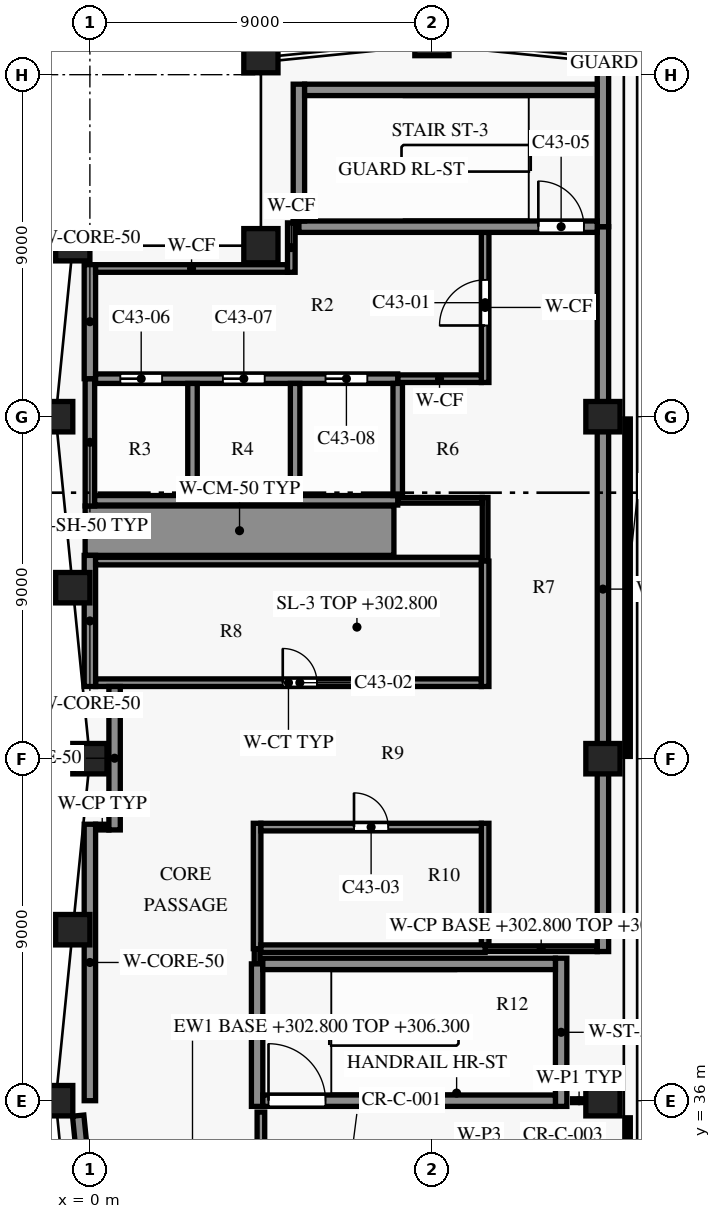
"""IFC4 building model, lengths in metres.
Left out: names, types, materials, properties, quantities, classifications, styles, units other than length and angle.
Written with IfcOpenShell. Run it as: python <this file> out.ifc"""

import sys

from ifc_helpers import new_model, si_unit, direction, frame, frame_2d, origin, origin_2d, place, context, subcontext, project, spatial, rectangle, extrude, element, fill, save


model = new_model("IFC4")
c1 = context("Model", 3, precision=1e-05, world=origin(), true_north=direction((0.0, 1.0)))
c2 = subcontext(c1, "Body", "Model", "MODEL_VIEW")
j1 = project(units=[si_unit("LENGTHUNIT", "METRE"), si_unit("PLANEANGLEUNIT", "RADIAN")], contexts=[c1])
p1 = place(None, origin())
s1 = spatial("IfcSite", under=j1, at=p1, CompositionType="ELEMENT")
p2 = place(p1, origin())
s2 = spatial("IfcBuilding", under=s1, at=p2, CompositionType="ELEMENT")
p3 = place(p2, frame((0.0, 0.0, 302.8)))
s3 = spatial("IfcBuildingStorey", under=s2, at=p3, CompositionType="ELEMENT", Elevation=302.8)
for number, where, z_axis, x_axis in (
    (1, (13.5, 36.0, 0.0), (0.0, 0.0, 1.0), (1.0, 0.0, 0.0)),
    (2, (13.5, 45.0, 0.0), (0.0, 0.0, 1.0), (1.0, 0.0, 0.0)),
    (3, (13.5, 54.0, 0.0), (0.0, 0.0, 1.0), (1.0, 0.0, 0.0)),
    (4, (13.5, 63.45, 0.0), (0.0, 0.0, 1.0), (-0.995, 0.1, 0.0)),
    (5, (9.0, 63.9, 0.0), (0.0, 0.0, 1.0), (-1.0, 0.0, 0.0)),
    (6, (4.5, 63.45, 0.0), (0.0, 0.0, 1.0), (-0.995, -0.1, 0.0)),
    (7, (-0.45, 58.5, 0.0), (0.0, 0.0, 1.0), (-0.1, -0.995, 0.0)),
    (8, (-0.9, 54.0, 0.0), (0.0, 0.0, 1.0), (0.0, -1.0, 0.0)),
    (9, (-0.45, 49.5, 0.0), (0.0, 0.0, 1.0), (0.1, -0.995, 0.0)),
    (10, (0.0, 45.0, 0.0), (0.0, 0.0, 1.0), (0.0, -1.0, 0.0)),
    (11, (-0.45, 40.5, 0.0), (0.0, 0.0, 1.0), (-0.1, -0.995, 0.0)),
    (12, (-0.9, 36.0, 0.0), (0.0, 0.0, 1.0), (0.0, -1.0, 0.0)),
):
    element("IfcColumn", number, at=place(p3, frame(where, z_axis=z_axis, x_axis=x_axis)), inside=s3, PredefinedType="COLUMN", context=c2, shape_type="SweptSolid", body=[
        extrude(rectangle(XDim=0.9, YDim=0.8, at=origin_2d()), origin(), (0.0, 0.0, 1.0), 4.0),
    ])
p4 = place(p3, frame((4.5, 58.5, 0.0), z_axis=(0.0, 0.0, 1.0), x_axis=(1.0, 0.0, 0.0)))
e13 = element("IfcColumn", 13, at=p4, inside=s3, PredefinedType="COLUMN", context=c2, shape_type="SweptSolid", body=[
    extrude(rectangle(XDim=0.9, YDim=0.9, at=origin_2d()), origin(), (0.0, 0.0, 1.0), 4.0),
])
p5 = place(p3, frame((0.061, 31.915, 0.0), z_axis=(0.0, 0.0, 1.0), x_axis=(-0.099549320092, 0.995032629048, 0.0)))
e14 = element("IfcWall", 14, at=p5, inside=s3, PredefinedType="SOLIDWALL", context=c2, shape_type="SweptSolid", body=[
    extrude(rectangle(XDim=3.71, YDim=0.3, at=frame_2d((1.855, 0.0))), origin(), (0.0, 0.0, 1.0), 3.5),
])
p6 = place(p3, frame((4.55, 36.0, 0.0), z_axis=(0.0, 0.0, 1.0), x_axis=(1.0, 0.0, 0.0)))
e15 = element("IfcWall", 15, at=p6, inside=s3, PredefinedType="SHEAR", context=c2, shape_type="SweptSolid", body=[
    extrude(rectangle(XDim=7.7, YDim=0.3, at=frame_2d((3.85, 0.0))), origin(), (0.0, 0.0, 1.0), 3.7),
])
p7 = place(p6, frame((0.15, 0.0, 0.0)))
e16 = element("IfcOpeningElement", 16, at=p7, cuts=e15, PredefinedType="OPENING", context=c2, shape_type="SweptSolid", body=[
    extrude(rectangle(XDim=1.5, YDim=2.2, at=frame_2d((0.75, 1.1))), frame((0.0, 0.16, 0.0), z_axis=(0.0, -1.0, 0.0), x_axis=(1.0, 0.0, 0.0)), (0.0, 0.0, 1.0), 0.32),
])
p8 = place(p3, frame((4.55, 39.6, 0.0), z_axis=(0.0, 0.0, 1.0), x_axis=(1.0, 0.0, 0.0)))
e17 = element("IfcWall", 17, at=p8, inside=s3, PredefinedType="SHEAR", context=c2, shape_type="SweptSolid", body=[
    extrude(rectangle(XDim=7.7, YDim=0.3, at=frame_2d((3.85, 0.0))), origin(), (0.0, 0.0, 1.0), 3.7),
])
p9 = place(p3, frame((10.4, 40.0, 0.0), z_axis=(0.0, 0.0, 1.0), x_axis=(1.0, 0.0, 0.0)))
e18 = element("IfcWall", 18, at=p9, inside=s3, PredefinedType="PARTITIONING", context=c2, shape_type="SweptSolid", body=[
    extrude(rectangle(XDim=2.95, YDim=0.15, at=frame_2d((1.475, 0.0))), origin(), (0.0, 0.0, 1.0), 3.35),
])
p10 = place(p3, frame((4.5, 40.0, 0.0), z_axis=(0.0, 0.0, 1.0), x_axis=(1.0, 0.0, 0.0)))
e19 = element("IfcWall", 19, at=p10, inside=s3, PredefinedType="PARTITIONING", context=c2, shape_type="SweptSolid", body=[
    extrude(rectangle(XDim=5.9, YDim=0.2, at=frame_2d((2.95, 0.0))), origin(), (0.0, 0.0, 1.0), 3.7),
])
p11 = place(p3, frame((0.15, 43.2, 0.0), z_axis=(0.0, 0.0, 1.0), x_axis=(1.0, 0.0, 0.0)))
e20 = element("IfcWall", 20, at=p11, inside=s3, PredefinedType="PARTITIONING", context=c2, shape_type="SweptSolid", body=[
    extrude(rectangle(XDim=0.35, YDim=0.15, at=frame_2d((0.175, 0.0))), origin(), (0.0, 0.0, 1.0), 3.7),
])
p12 = place(p3, frame((4.5, 43.2, 0.0), z_axis=(0.0, 0.0, 1.0), x_axis=(1.0, 0.0, 0.0)))
e21 = element("IfcWall", 21, at=p12, inside=s3, PredefinedType="PARTITIONING", context=c2, shape_type="SweptSolid", body=[
    extrude(rectangle(XDim=5.8, YDim=0.2, at=frame_2d((2.9, 0.0))), origin(), (0.0, 0.0, 1.0), 3.7),
])
p13 = place(p12, frame((2.45, 0.0, 0.0)))
e22 = element("IfcOpeningElement", 22, at=p13, cuts=e21, PredefinedType="OPENING", context=c2, shape_type="SweptSolid", body=[
    extrude(rectangle(XDim=0.9, YDim=2.1, at=frame_2d((0.45, 1.05))), frame((0.0, 0.11, 0.0), z_axis=(0.0, -1.0, 0.0), x_axis=(1.0, 0.0, 0.0)), (0.0, 0.0, 1.0), 0.22),
])
p14 = place(p3, frame((0.15, 47.0, 0.0), z_axis=(0.0, 0.0, 1.0), x_axis=(1.0, 0.0, 0.0)))
e23 = element("IfcWall", 23, at=p14, inside=s3, PredefinedType="PARTITIONING", context=c2, shape_type="SweptSolid", body=[
    extrude(rectangle(XDim=10.15, YDim=0.2, at=frame_2d((5.075, 0.0))), origin(), (0.0, 0.0, 1.0), 3.7),
])
p15 = place(p14, frame((4.925, 0.0, 0.0)))
e24 = element("IfcOpeningElement", 24, at=p15, cuts=e23, PredefinedType="OPENING", context=c2, shape_type="SweptSolid", body=[
    extrude(rectangle(XDim=0.9, YDim=2.1, at=frame_2d((0.45, 1.05))), frame((0.0, 0.11, 0.0), z_axis=(0.0, -1.0, 0.0), x_axis=(1.0, 0.0, 0.0)), (0.0, 0.0, 1.0), 0.22),
])
p16 = place(p3, frame((0.15, 50.2, 0.0), z_axis=(0.0, 0.0, 1.0), x_axis=(1.0, 0.0, 0.0)))
e25 = element("IfcWall", 25, at=p16, inside=s3, PredefinedType="PARTITIONING", context=c2, shape_type="SweptSolid", body=[
    extrude(rectangle(XDim=10.15, YDim=0.2, at=frame_2d((5.075, 0.0))), origin(), (0.0, 0.0, 1.0), 3.7),
])
p17 = place(p3, frame((-0.125, 51.0, 0.0), z_axis=(0.0, 0.0, 1.0), x_axis=(1.0, 0.0, 0.0)))
e26 = element("IfcWall", 26, at=p17, inside=s3, PredefinedType="SHEAR", context=c2, shape_type="SweptSolid", body=[
    extrude(rectangle(XDim=8.125, YDim=1.3, at=frame_2d((4.062, 0.0))), origin(), (0.0, 0.0, 1.0), 3.7),
])
p18 = place(p3, frame((8.1, 51.8, 0.0), z_axis=(0.0, 0.0, 1.0), x_axis=(1.0, 0.0, 0.0)))
e27 = element("IfcWall", 27, at=p18, inside=s3, PredefinedType="PARTITIONING", context=c2, shape_type="SweptSolid", body=[
    extrude(rectangle(XDim=2.225, YDim=0.15, at=frame_2d((1.112, 0.0))), origin(), (0.0, 0.0, 1.0), 3.7),
])
p19 = place(p3, frame((0.125, 51.8, 0.0), z_axis=(0.0, 0.0, 1.0), x_axis=(1.0, 0.0, 0.0)))
e28 = element("IfcWall", 28, at=p19, inside=s3, PredefinedType="SHEAR", context=c2, shape_type="SweptSolid", body=[
    extrude(rectangle(XDim=7.975, YDim=0.25, at=frame_2d((3.988, 0.0))), origin(), (0.0, 0.0, 1.0), 3.7),
])
p20 = place(p3, frame((8.1, 55.0, 0.0), z_axis=(0.0, 0.0, 1.0), x_axis=(1.0, 0.0, 0.0)))
e29 = element("IfcWall", 29, at=p20, inside=s3, PredefinedType="PARTITIONING", context=c2, shape_type="SweptSolid", body=[
    extrude(rectangle(XDim=2.2, YDim=0.2, at=frame_2d((1.1, 0.0))), origin(), (0.0, 0.0, 1.0), 3.7),
])
p21 = place(p3, frame((0.15, 55.0, 0.0), z_axis=(0.0, 0.0, 1.0), x_axis=(1.0, 0.0, 0.0)))
e30 = element("IfcWall", 30, at=p21, inside=s3, PredefinedType="SHEAR", context=c2, shape_type="SweptSolid", body=[
    extrude(rectangle(XDim=7.95, YDim=0.25, at=frame_2d((3.975, 0.0))), origin(), (0.0, 0.0, 1.0), 3.7),
])
p22 = place(p21, frame((0.65, 0.0, 0.0)))
e31 = element("IfcOpeningElement", 31, at=p22, cuts=e30, PredefinedType="OPENING", context=c2, shape_type="SweptSolid", body=[
    extrude(rectangle(XDim=1.1, YDim=2.1, at=frame_2d((0.55, 1.05))), frame((0.0, 0.135, 0.0), z_axis=(0.0, -1.0, 0.0), x_axis=(1.0, 0.0, 0.0)), (0.0, 0.0, 1.0), 0.27),
])
p23 = place(p21, frame((3.35, 0.0, 0.0)))
e32 = element("IfcOpeningElement", 32, at=p23, cuts=e30, PredefinedType="OPENING", context=c2, shape_type="SweptSolid", body=[
    extrude(rectangle(XDim=1.1, YDim=2.1, at=frame_2d((0.55, 1.05))), frame((0.0, 0.135, 0.0), z_axis=(0.0, -1.0, 0.0), x_axis=(1.0, 0.0, 0.0)), (0.0, 0.0, 1.0), 0.27),
])
p24 = place(p21, frame((6.05, 0.0, 0.0)))
e33 = element("IfcOpeningElement", 33, at=p24, cuts=e30, PredefinedType="OPENING", context=c2, shape_type="SweptSolid", body=[
    extrude(rectangle(XDim=1.1, YDim=2.1, at=frame_2d((0.55, 1.05))), frame((0.0, 0.135, 0.0), z_axis=(0.0, -1.0, 0.0), x_axis=(1.0, 0.0, 0.0)), (0.0, 0.0, 1.0), 0.27),
])
p25 = place(p3, frame((0.15, 57.9, 0.0), z_axis=(0.0, 0.0, 1.0), x_axis=(1.0, 0.0, 0.0)))
e34 = element("IfcWall", 34, at=p25, inside=s3, PredefinedType="PARTITIONING", context=c2, shape_type="SweptSolid", body=[
    extrude(rectangle(XDim=5.05, YDim=0.2, at=frame_2d((2.525, 0.0))), origin(), (0.0, 0.0, 1.0), 3.7),
])
p26 = place(p3, frame((5.5, 59.0, 0.0), z_axis=(0.0, 0.0, 1.0), x_axis=(1.0, 0.0, 0.0)))
e35 = element("IfcWall", 35, at=p26, inside=s3, PredefinedType="SHEAR", context=c2, shape_type="SweptSolid", body=[
    extrude(rectangle(XDim=7.85, YDim=0.3, at=frame_2d((3.925, 0.0))), origin(), (0.0, 0.0, 1.0), 3.7),
])
p27 = place(p26, frame((6.3, 0.0, 0.0)))
e36 = element("IfcOpeningElement", 36, at=p27, cuts=e35, PredefinedType="OPENING", context=c2, shape_type="SweptSolid", body=[
    extrude(rectangle(XDim=1.2, YDim=2.2, at=frame_2d((0.6, 1.1))), frame((0.0, 0.16, 0.0), z_axis=(0.0, -1.0, 0.0), x_axis=(1.0, 0.0, 0.0)), (0.0, 0.0, 1.0), 0.32),
])
p28 = place(p3, frame((5.65, 62.6, 0.0), z_axis=(0.0, 0.0, 1.0), x_axis=(1.0, 0.0, 0.0)))
e37 = element("IfcWall", 37, at=p28, inside=s3, PredefinedType="SHEAR", context=c2, shape_type="SweptSolid", body=[
    extrude(rectangle(XDim=7.7, YDim=0.3, at=frame_2d((3.85, 0.0))), origin(), (0.0, 0.0, 1.0), 3.7),
])
p29 = place(p3, frame((0.0, 36.0, 0.0), z_axis=(0.0, 0.0, 1.0), x_axis=(0.0, 1.0, 0.0)))
e38 = element("IfcWall", 38, at=p29, inside=s3, PredefinedType="SHEAR", context=c2, shape_type="SweptSolid", body=[
    extrude(rectangle(XDim=7.275, YDim=0.3, at=frame_2d((3.637, 0.0))), origin(), (0.0, 0.0, 1.0), 3.7),
])
p30 = place(p3, frame((0.0, 46.9, 0.0), z_axis=(0.0, 0.0, 1.0), x_axis=(0.0, 1.0, 0.0)))
e39 = element("IfcWall", 39, at=p30, inside=s3, PredefinedType="SHEAR", context=c2, shape_type="SweptSolid", body=[
    extrude(rectangle(XDim=3.45, YDim=0.3, at=frame_2d((1.725, 0.0))), origin(), (0.0, 0.0, 1.0), 3.7),
])
p31 = place(p3, frame((0.0, 55.0, 0.0), z_axis=(0.0, 0.0, 1.0), x_axis=(0.0, 1.0, 0.0)))
e40 = element("IfcWall", 40, at=p31, inside=s3, PredefinedType="SHEAR", context=c2, shape_type="SweptSolid", body=[
    extrude(rectangle(XDim=3.0, YDim=0.3, at=frame_2d((1.5, 0.0))), origin(), (0.0, 0.0, 1.0), 3.7),
])
p32 = place(p3, frame((0.0, 51.65, 0.0), z_axis=(0.0, 0.0, 1.0), x_axis=(0.0, 1.0, 0.0)))
e41 = element("IfcWall", 41, at=p32, inside=s3, PredefinedType="SHEAR", context=c2, shape_type="SweptSolid", body=[
    extrude(rectangle(XDim=3.35, YDim=0.25, at=frame_2d((1.675, 0.0))), origin(), (0.0, 0.0, 1.0), 3.7),
])
p33 = place(p3, frame((0.65, 43.125, 0.0), z_axis=(0.0, 0.0, 1.0), x_axis=(0.0, 1.0, 0.0)))
e42 = element("IfcWall", 42, at=p33, inside=s3, PredefinedType="SHEAR", context=c2, shape_type="SweptSolid", body=[
    extrude(rectangle(XDim=3.775, YDim=0.3, at=frame_2d((1.887, 0.0))), origin(), (0.0, 0.0, 1.0), 3.7),
])
p34 = place(p3, frame((2.7, 51.925, 0.0), z_axis=(0.0, 0.0, 1.0), x_axis=(0.0, 1.0, 0.0)))
e43 = element("IfcWall", 43, at=p34, inside=s3, PredefinedType="SHEAR", context=c2, shape_type="SweptSolid", body=[
    extrude(rectangle(XDim=2.95, YDim=0.25, at=frame_2d((1.475, 0.0))), origin(), (0.0, 0.0, 1.0), 3.7),
])
p35 = place(p3, frame((4.4, 39.6, 0.0), z_axis=(0.0, 0.0, 1.0), x_axis=(0.0, 1.0, 0.0)))
e44 = element("IfcWall", 44, at=p35, inside=s3, PredefinedType="PARTITIONING", context=c2, shape_type="SweptSolid", body=[
    extrude(rectangle(XDim=0.4, YDim=0.15, at=frame_2d((0.2, 0.0))), origin(), (0.0, 0.0, 1.0), 3.7),
])
p36 = place(p3, frame((4.4, 40.0, 0.0), z_axis=(0.0, 0.0, 1.0), x_axis=(0.0, 1.0, 0.0)))
e45 = element("IfcWall", 45, at=p36, inside=s3, PredefinedType="PARTITIONING", context=c2, shape_type="SweptSolid", body=[
    extrude(rectangle(XDim=3.3, YDim=0.2, at=frame_2d((1.65, 0.0))), origin(), (0.0, 0.0, 1.0), 3.7),
])
p37 = place(p3, frame((4.4, 35.85, 0.0), z_axis=(0.0, 0.0, 1.0), x_axis=(0.0, 1.0, 0.0)))
e46 = element("IfcWall", 46, at=p37, inside=s3, PredefinedType="SHEAR", context=c2, shape_type="SweptSolid", body=[
    extrude(rectangle(XDim=3.75, YDim=0.3, at=frame_2d((1.875, 0.0))), origin(), (0.0, 0.0, 1.0), 3.7),
])
p38 = place(p3, frame((5.3, 57.8, 0.0), z_axis=(0.0, 0.0, 1.0), x_axis=(0.0, 1.0, 0.0)))
e47 = element("IfcWall", 47, at=p38, inside=s3, PredefinedType="PARTITIONING", context=c2, shape_type="SweptSolid", body=[
    extrude(rectangle(XDim=1.3, YDim=0.2, at=frame_2d((0.65, 0.0))), origin(), (0.0, 0.0, 1.0), 3.7),
])
p39 = place(p3, frame((5.4, 51.925, 0.0), z_axis=(0.0, 0.0, 1.0), x_axis=(0.0, 1.0, 0.0)))
e48 = element("IfcWall", 48, at=p39, inside=s3, PredefinedType="SHEAR", context=c2, shape_type="SweptSolid", body=[
    extrude(rectangle(XDim=2.95, YDim=0.25, at=frame_2d((1.475, 0.0))), origin(), (0.0, 0.0, 1.0), 3.7),
])
p40 = place(p3, frame((5.5, 59.15, 0.0), z_axis=(0.0, 0.0, 1.0), x_axis=(0.0, 1.0, 0.0)))
e49 = element("IfcWall", 49, at=p40, inside=s3, PredefinedType="SHEAR", context=c2, shape_type="SweptSolid", body=[
    extrude(rectangle(XDim=3.6, YDim=0.3, at=frame_2d((1.8, 0.0))), origin(), (0.0, 0.0, 1.0), 3.7),
])
p41 = place(p3, frame((8.1, 51.925, 0.0), z_axis=(0.0, 0.0, 1.0), x_axis=(0.0, 1.0, 0.0)))
e50 = element("IfcWall", 50, at=p41, inside=s3, PredefinedType="SHEAR", context=c2, shape_type="SweptSolid", body=[
    extrude(rectangle(XDim=2.95, YDim=0.25, at=frame_2d((1.475, 0.0))), origin(), (0.0, 0.0, 1.0), 3.7),
])
p42 = place(p3, frame((10.4, 54.9, 0.0), z_axis=(0.0, 0.0, 1.0), x_axis=(0.0, 1.0, 0.0)))
e51 = element("IfcWall", 51, at=p42, inside=s3, PredefinedType="PARTITIONING", context=c2, shape_type="SweptSolid", body=[
    extrude(rectangle(XDim=3.95, YDim=0.2, at=frame_2d((1.975, 0.0))), origin(), (0.0, 0.0, 1.0), 3.7),
])
p43 = place(p42, frame((1.5, 0.0, 0.0)))
e52 = element("IfcOpeningElement", 52, at=p43, cuts=e51, PredefinedType="OPENING", context=c2, shape_type="SweptSolid", body=[
    extrude(rectangle(XDim=1.2, YDim=2.2, at=frame_2d((0.6, 1.1))), frame((0.0, 0.11, 0.0), z_axis=(0.0, -1.0, 0.0), x_axis=(1.0, 0.0, 0.0)), (0.0, 0.0, 1.0), 0.22),
])
p44 = place(p3, frame((10.4, 50.2, 0.0), z_axis=(0.0, 0.0, 1.0), x_axis=(0.0, 1.0, 0.0)))
e53 = element("IfcWall", 53, at=p44, inside=s3, PredefinedType="PARTITIONING", context=c2, shape_type="SweptSolid", body=[
    extrude(rectangle(XDim=1.675, YDim=0.15, at=frame_2d((0.837, 0.0))), origin(), (0.0, 0.0, 1.0), 3.7),
])
p45 = place(p3, frame((10.4, 40.1, 0.0), z_axis=(0.0, 0.0, 1.0), x_axis=(0.0, 1.0, 0.0)))
e54 = element("IfcWall", 54, at=p45, inside=s3, PredefinedType="PARTITIONING", context=c2, shape_type="SweptSolid", body=[
    extrude(rectangle(XDim=3.2, YDim=0.2, at=frame_2d((1.6, 0.0))), origin(), (0.0, 0.0, 1.0), 3.7),
])
p46 = place(p3, frame((10.4, 46.9, 0.0), z_axis=(0.0, 0.0, 1.0), x_axis=(0.0, 1.0, 0.0)))
e55 = element("IfcWall", 55, at=p46, inside=s3, PredefinedType="PARTITIONING", context=c2, shape_type="SweptSolid", body=[
    extrude(rectangle(XDim=3.3, YDim=0.2, at=frame_2d((1.65, 0.0))), origin(), (0.0, 0.0, 1.0), 3.7),
])
p47 = place(p3, frame((12.4, 35.85, 0.0), z_axis=(0.0, 0.0, 1.0), x_axis=(0.0, 1.0, 0.0)))
e56 = element("IfcWall", 56, at=p47, inside=s3, PredefinedType="SHEAR", context=c2, shape_type="SweptSolid", body=[
    extrude(rectangle(XDim=3.9, YDim=0.3, at=frame_2d((1.95, 0.0))), origin(), (0.0, 0.0, 1.0), 3.7),
])
p48 = place(p3, frame((13.5, 39.925, 0.0), z_axis=(0.0, 0.0, 1.0), x_axis=(0.0, 1.0, 0.0)))
e57 = element("IfcWall", 57, at=p48, inside=s3, PredefinedType="SHEAR", context=c2, shape_type="SweptSolid", body=[
    extrude(rectangle(XDim=19.075, YDim=0.3, at=frame_2d((9.538, 0.0))), origin(), (0.0, 0.0, 1.0), 3.7),
])
p49 = place(p3, frame((13.5, 59.0, 0.0), z_axis=(0.0, 0.0, 1.0), x_axis=(0.0, 1.0, 0.0)))
e58 = element("IfcWall", 58, at=p49, inside=s3, PredefinedType="SHEAR", context=c2, shape_type="SweptSolid", body=[
    extrude(rectangle(XDim=4.048, YDim=0.3, at=frame_2d((2.024, 0.0))), origin(), (0.0, 0.0, 1.0), 3.7),
])
p50 = place(p3, frame((4.5, 33.6, 0.0), z_axis=(0.0, 0.0, 1.0), x_axis=(0.0, 1.0, 0.0)))
e59 = element("IfcWall", 59, at=p50, inside=s3, PredefinedType="PARTITIONING", context=c2, shape_type="SweptSolid", body=[
    extrude(rectangle(XDim=2.1, YDim=0.2, at=frame_2d((1.05, 0.0))), origin(), (0.0, 0.0, 1.0), 3.68),
])
p51 = place(p3, frame((12.7, 36.0, 0.0), z_axis=(0.0, 0.0, 1.0), x_axis=(1.0, 0.0, 0.0)))
e60 = element("IfcWall", 60, at=p51, inside=s3, PredefinedType="PARTITIONING", context=c2, shape_type="SweptSolid", body=[
    extrude(rectangle(XDim=0.345, YDim=0.1, at=frame_2d((0.172, 0.0))), origin(), (0.0, 0.0, 1.0), 3.68),
])
p52 = place(p43, origin())
e61 = element("IfcDoor", 61, at=p52, inside=s3, OperationType="SINGLE_SWING_RIGHT", PredefinedType="DOOR", context=c2, shape_type="SweptSolid", body=[
    extrude(rectangle(XDim=1.2, YDim=2.2, at=frame_2d((0.6, 1.1))), frame((0.0, 0.025, 0.0), z_axis=(0.0, -1.0, 0.0), x_axis=(1.0, 0.0, 0.0)), (0.0, 0.0, 1.0), 0.05),
])
fill(e52, e61)
p53 = place(p15, origin())
e62 = element("IfcDoor", 62, at=p53, inside=s3, OperationType="SINGLE_SWING_RIGHT", PredefinedType="DOOR", context=c2, shape_type="SweptSolid", body=[
    extrude(rectangle(XDim=0.9, YDim=2.1, at=frame_2d((0.45, 1.05))), frame((0.0, 0.025, 0.0), z_axis=(0.0, -1.0, 0.0), x_axis=(1.0, 0.0, 0.0)), (0.0, 0.0, 1.0), 0.05),
])
fill(e24, e62)
p54 = place(p13, origin())
e63 = element("IfcDoor", 63, at=p54, inside=s3, OperationType="SINGLE_SWING_LEFT", PredefinedType="DOOR", context=c2, shape_type="SweptSolid", body=[
    extrude(rectangle(XDim=0.9, YDim=2.1, at=frame_2d((0.45, 1.05))), frame((0.0, 0.025, 0.0), z_axis=(0.0, -1.0, 0.0), x_axis=(1.0, 0.0, 0.0)), (0.0, 0.0, 1.0), 0.05),
])
fill(e22, e63)
p55 = place(p7, origin())
e64 = element("IfcDoor", 64, at=p55, inside=s3, OperationType="SINGLE_SWING_RIGHT", PredefinedType="DOOR", context=c2, shape_type="SweptSolid", body=[
    extrude(rectangle(XDim=1.5, YDim=2.2, at=frame_2d((0.75, 1.1))), frame((0.0, 0.025, 0.0), z_axis=(0.0, -1.0, 0.0), x_axis=(1.0, 0.0, 0.0)), (0.0, 0.0, 1.0), 0.05),
])
fill(e16, e64)
p56 = place(p27, origin())
e65 = element("IfcDoor", 65, at=p56, inside=s3, OperationType="SINGLE_SWING_RIGHT", PredefinedType="DOOR", context=c2, shape_type="SweptSolid", body=[
    extrude(rectangle(XDim=1.2, YDim=2.2, at=frame_2d((0.6, 1.1))), frame((0.0, 0.025, 0.0), z_axis=(0.0, -1.0, 0.0), x_axis=(1.0, 0.0, 0.0)), (0.0, 0.0, 1.0), 0.05),
])
fill(e36, e65)
p57 = place(p22, origin())
e66 = element("IfcDoor", 66, at=p57, inside=s3, OperationType="DOUBLE_DOOR_SLIDING", PredefinedType="DOOR", context=c2, shape_type="SweptSolid", body=[
    extrude(rectangle(XDim=1.1, YDim=2.1, at=frame_2d((0.55, 1.05))), frame((0.0, 0.025, 0.0), z_axis=(0.0, -1.0, 0.0), x_axis=(1.0, 0.0, 0.0)), (0.0, 0.0, 1.0), 0.05),
])
fill(e31, e66)
p58 = place(p23, origin())
e67 = element("IfcDoor", 67, at=p58, inside=s3, OperationType="DOUBLE_DOOR_SLIDING", PredefinedType="DOOR", context=c2, shape_type="SweptSolid", body=[
    extrude(rectangle(XDim=1.1, YDim=2.1, at=frame_2d((0.55, 1.05))), frame((0.0, 0.025, 0.0), z_axis=(0.0, -1.0, 0.0), x_axis=(1.0, 0.0, 0.0)), (0.0, 0.0, 1.0), 0.05),
])
fill(e32, e67)
p59 = place(p24, origin())
e68 = element("IfcDoor", 68, at=p59, inside=s3, OperationType="DOUBLE_DOOR_SLIDING", PredefinedType="DOOR", context=c2, shape_type="SweptSolid", body=[
    extrude(rectangle(XDim=1.1, YDim=2.1, at=frame_2d((0.55, 1.05))), frame((0.0, 0.025, 0.0), z_axis=(0.0, -1.0, 0.0), x_axis=(1.0, 0.0, 0.0)), (0.0, 0.0, 1.0), 0.05),
])
fill(e33, e68)
save(model, sys.argv[1])
